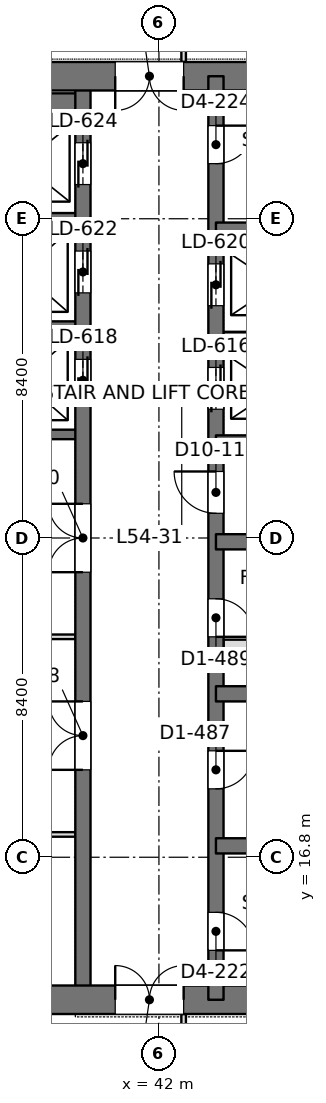
"""IFC4 building model, lengths in metres.
Left out: names, types, materials, properties, quantities, classifications, styles, units other than length and angle.
Written with IfcOpenShell. Run it as: python <this file> out.ifc"""

import sys

from ifc_helpers import new_model, si_unit, direction, frame, frame_2d, origin, place, context, subcontext, project, spatial, rectangle, extrude, element, fill, save


model = new_model("IFC4")
c1 = context("Model", 3, precision=1e-05, world=origin(), true_north=direction((0.0, 1.0)))
c2 = subcontext(c1, "Body", "Model", "MODEL_VIEW")
j1 = project(units=[si_unit("LENGTHUNIT", "METRE"), si_unit("PLANEANGLEUNIT", "RADIAN")], contexts=[c1])
p1 = place(None, origin())
s1 = spatial("IfcSite", under=j1, at=p1, CompositionType="ELEMENT")
p2 = place(p1, origin())
s2 = spatial("IfcBuilding", under=s1, at=p2, CompositionType="ELEMENT")
p3 = place(p2, frame((0.0, 0.0, 236.4)))
s3 = spatial("IfcBuildingStorey", under=s2, at=p3, CompositionType="ELEMENT", Elevation=236.4)
p4 = place(p3, frame((33.675, 13.05, 0.0), z_axis=(0.0, 0.0, 1.0), x_axis=(1.0, 0.0, 0.0)))
e1 = element("IfcWall", 1, at=p4, inside=s3, PredefinedType="SHEAR", context=c2, shape_type="SweptSolid", body=[
    extrude(rectangle(XDim=17.85, YDim=0.75, at=frame_2d((8.925, 0.0))), origin(), (0.0, 0.0, 1.0), 4.2),
])
p5 = place(p4, frame((7.175, 0.0, 0.0)))
e2 = element("IfcOpeningElement", 2, at=p5, cuts=e1, PredefinedType="OPENING", context=c2, shape_type="SweptSolid", body=[
    extrude(rectangle(XDim=1.8, YDim=2.4, at=frame_2d((0.9, 1.2))), frame((0.0, 0.385, 0.0), z_axis=(0.0, -1.0, 0.0), x_axis=(1.0, 0.0, 0.0)), (0.0, 0.0, 1.0), 0.77),
])
p6 = place(p3, frame((33.675, 37.35, 0.0), z_axis=(0.0, 0.0, 1.0), x_axis=(1.0, 0.0, 0.0)))
e3 = element("IfcWall", 3, at=p6, inside=s3, PredefinedType="SHEAR", context=c2, shape_type="SweptSolid", body=[
    extrude(rectangle(XDim=17.85, YDim=0.75, at=frame_2d((8.925, 0.0))), origin(), (0.0, 0.0, 1.0), 4.2),
])
p7 = place(p6, frame((7.175, 0.0, 0.0)))
e4 = element("IfcOpeningElement", 4, at=p7, cuts=e3, PredefinedType="OPENING", context=c2, shape_type="SweptSolid", body=[
    extrude(rectangle(XDim=1.8, YDim=2.4, at=frame_2d((0.9, 1.2))), frame((0.0, 0.385, 0.0), z_axis=(0.0, -1.0, 0.0), x_axis=(1.0, 0.0, 0.0)), (0.0, 0.0, 1.0), 0.77),
])
p8 = place(p3, frame((43.5, 13.05, 0.0), z_axis=(0.0, 0.0, 1.0), x_axis=(0.0, 1.0, 0.0)))
e5 = element("IfcWall", 5, at=p8, inside=s3, PredefinedType="SHEAR", context=c2, shape_type="SweptSolid", body=[
    extrude(rectangle(XDim=24.3, YDim=0.4, at=frame_2d((12.15, 0.0))), origin(), (0.0, 0.0, 1.0), 4.2),
])
p9 = place(p8, frame((1.3, 0.0, 0.0)))
e6 = element("IfcOpeningElement", 6, at=p9, cuts=e5, PredefinedType="OPENING", context=c2, shape_type="SweptSolid", body=[
    extrude(rectangle(XDim=1.0, YDim=2.2, at=frame_2d((0.5, 1.1))), frame((0.0, 0.21, 0.0), z_axis=(0.0, -1.0, 0.0), x_axis=(1.0, 0.0, 0.0)), (0.0, 0.0, 1.0), 0.42),
])
p10 = place(p8, frame((22.0, 0.0, 0.0)))
e7 = element("IfcOpeningElement", 7, at=p10, cuts=e5, PredefinedType="OPENING", context=c2, shape_type="SweptSolid", body=[
    extrude(rectangle(XDim=1.0, YDim=2.2, at=frame_2d((0.5, 1.1))), frame((0.0, 0.21, 0.0), z_axis=(0.0, -1.0, 0.0), x_axis=(1.0, 0.0, 0.0)), (0.0, 0.0, 1.0), 0.42),
])
p11 = place(p8, frame((5.55, 0.0, 0.0)))
e8 = element("IfcOpeningElement", 8, at=p11, cuts=e5, PredefinedType="OPENING", context=c2, shape_type="SweptSolid", body=[
    extrude(rectangle(XDim=1.0, YDim=2.2, at=frame_2d((0.5, 1.1))), frame((0.0, 0.21, 0.0), z_axis=(0.0, -1.0, 0.0), x_axis=(1.0, 0.0, 0.0)), (0.0, 0.0, 1.0), 0.42),
])
p12 = place(p8, frame((9.55, 0.0, 0.0)))
e9 = element("IfcOpeningElement", 9, at=p12, cuts=e5, PredefinedType="OPENING", context=c2, shape_type="SweptSolid", body=[
    extrude(rectangle(XDim=1.0, YDim=2.2, at=frame_2d((0.5, 1.1))), frame((0.0, 0.21, 0.0), z_axis=(0.0, -1.0, 0.0), x_axis=(1.0, 0.0, 0.0)), (0.0, 0.0, 1.0), 0.42),
])
p13 = place(p8, frame((12.8, 0.0, 0.0)))
e10 = element("IfcOpeningElement", 10, at=p13, cuts=e5, PredefinedType="OPENING", context=c2, shape_type="SweptSolid", body=[
    extrude(rectangle(XDim=1.1, YDim=2.2, at=frame_2d((0.55, 1.1))), frame((0.0, 0.21, 0.0), z_axis=(0.0, -1.0, 0.0), x_axis=(1.0, 0.0, 0.0)), (0.0, 0.0, 1.0), 0.42),
])
p14 = place(p8, frame((15.538, 0.0, 0.0)))
e11 = element("IfcOpeningElement", 11, at=p14, cuts=e5, PredefinedType="OPENING", context=c2, shape_type="SweptSolid", body=[
    extrude(rectangle(XDim=1.1, YDim=2.2, at=frame_2d((0.55, 1.1))), frame((0.0, 0.21, 0.0), z_axis=(0.0, -1.0, 0.0), x_axis=(1.0, 0.0, 0.0)), (0.0, 0.0, 1.0), 0.42),
])
p15 = place(p8, frame((18.262, 0.0, 0.0)))
e12 = element("IfcOpeningElement", 12, at=p15, cuts=e5, PredefinedType="OPENING", context=c2, shape_type="SweptSolid", body=[
    extrude(rectangle(XDim=1.1, YDim=2.2, at=frame_2d((0.55, 1.1))), frame((0.0, 0.21, 0.0), z_axis=(0.0, -1.0, 0.0), x_axis=(1.0, 0.0, 0.0)), (0.0, 0.0, 1.0), 0.42),
])
p16 = place(p3, frame((40.0, 13.05, 0.0), z_axis=(0.0, 0.0, 1.0), x_axis=(0.0, 1.0, 0.0)))
e13 = element("IfcWall", 13, at=p16, inside=s3, PredefinedType="SHEAR", context=c2, shape_type="SweptSolid", body=[
    extrude(rectangle(XDim=24.3, YDim=0.4, at=frame_2d((12.15, 0.0))), origin(), (0.0, 0.0, 1.0), 4.2),
])
p17 = place(p16, frame((15.75, 0.0, 0.0)))
e14 = element("IfcOpeningElement", 14, at=p17, cuts=e13, PredefinedType="OPENING", context=c2, shape_type="SweptSolid", body=[
    extrude(rectangle(XDim=1.1, YDim=2.2, at=frame_2d((0.55, 1.1))), frame((0.0, 0.21, 0.0), z_axis=(0.0, -1.0, 0.0), x_axis=(1.0, 0.0, 0.0)), (0.0, 0.0, 1.0), 0.42),
])
p18 = place(p16, frame((18.6, 0.0, 0.0)))
e15 = element("IfcOpeningElement", 15, at=p18, cuts=e13, PredefinedType="OPENING", context=c2, shape_type="SweptSolid", body=[
    extrude(rectangle(XDim=1.1, YDim=2.2, at=frame_2d((0.55, 1.1))), frame((0.0, 0.21, 0.0), z_axis=(0.0, -1.0, 0.0), x_axis=(1.0, 0.0, 0.0)), (0.0, 0.0, 1.0), 0.42),
])
p19 = place(p16, frame((21.45, 0.0, 0.0)))
e16 = element("IfcOpeningElement", 16, at=p19, cuts=e13, PredefinedType="OPENING", context=c2, shape_type="SweptSolid", body=[
    extrude(rectangle(XDim=1.1, YDim=2.2, at=frame_2d((0.55, 1.1))), frame((0.0, 0.21, 0.0), z_axis=(0.0, -1.0, 0.0), x_axis=(1.0, 0.0, 0.0)), (0.0, 0.0, 1.0), 0.42),
])
p20 = place(p16, frame((6.05, 0.0, 0.0)))
e17 = element("IfcOpeningElement", 17, at=p20, cuts=e13, PredefinedType="OPENING", context=c2, shape_type="SweptSolid", body=[
    extrude(rectangle(XDim=1.8, YDim=2.4, at=frame_2d((0.9, 1.2))), frame((0.0, 0.21, 0.0), z_axis=(0.0, -1.0, 0.0), x_axis=(1.0, 0.0, 0.0)), (0.0, 0.0, 1.0), 0.42),
])
p21 = place(p16, frame((11.25, 0.0, 0.0)))
e18 = element("IfcOpeningElement", 18, at=p21, cuts=e13, PredefinedType="OPENING", context=c2, shape_type="SweptSolid", body=[
    extrude(rectangle(XDim=1.8, YDim=2.4, at=frame_2d((0.9, 1.2))), frame((0.0, 0.21, 0.0), z_axis=(0.0, -1.0, 0.0), x_axis=(1.0, 0.0, 0.0)), (0.0, 0.0, 1.0), 0.42),
])
for number, where, z_axis, x_axis in (
    (19, (51.15, 17.1, 0.0), (0.0, 0.0, 1.0), (-1.0, 0.0, 0.0)),
    (20, (51.15, 21.1, 0.0), (0.0, 0.0, 1.0), (-1.0, 0.0, 0.0)),
    (21, (51.15, 25.1, 0.0), (0.0, 0.0, 1.0), (-1.0, 0.0, 0.0)),
    (22, (51.15, 27.7, 0.0), (0.0, 0.0, 1.0), (-1.0, 0.0, 0.0)),
    (23, (51.15, 33.3, 0.0), (0.0, 0.0, 1.0), (-1.0, 0.0, 0.0)),
):
    element("IfcWall", number, at=place(p3, frame(where, z_axis=z_axis, x_axis=x_axis)), inside=s3, PredefinedType="SHEAR", context=c2, shape_type="SweptSolid", body=[
        extrude(rectangle(XDim=7.65, YDim=0.4, at=frame_2d((3.825, 0.0))), origin(), (0.0, 0.0, 1.0), 4.2),
    ])
p22 = place(p3, frame((46.7, 30.5, 0.0), z_axis=(0.0, 0.0, 1.0), x_axis=(-1.0, 0.0, 0.0)))
e24 = element("IfcWall", 24, at=p22, inside=s3, PredefinedType="SHEAR", context=c2, shape_type="SweptSolid", body=[
    extrude(rectangle(XDim=3.2, YDim=0.25, at=frame_2d((1.6, 0.0))), origin(), (0.0, 0.0, 1.0), 4.2),
])
p23 = place(p3, frame((40.0, 27.925, 0.0), z_axis=(0.0, 0.0, 1.0), x_axis=(-1.0, 0.0, 0.0)))
e25 = element("IfcWall", 25, at=p23, inside=s3, PredefinedType="SHEAR", context=c2, shape_type="SweptSolid", body=[
    extrude(rectangle(XDim=5.95, YDim=0.25, at=frame_2d((2.975, 0.0))), origin(), (0.0, 0.0, 1.0), 4.2),
])
for number, where, z_axis, x_axis in (
    (26, (40.0, 30.775, 0.0), (0.0, 0.0, 1.0), (-1.0, 0.0, 0.0)),
    (27, (40.0, 33.625, 0.0), (0.0, 0.0, 1.0), (-1.0, 0.0, 0.0)),
):
    element("IfcWall", number, at=place(p3, frame(where, z_axis=z_axis, x_axis=x_axis)), inside=s3, PredefinedType="SHEAR", context=c2, shape_type="SweptSolid", body=[
        extrude(rectangle(XDim=3.2, YDim=0.25, at=frame_2d((1.6, 0.0))), origin(), (0.0, 0.0, 1.0), 4.2),
    ])
p24 = place(p3, frame((40.0, 36.625, 0.0), z_axis=(0.0, 0.0, 1.0), x_axis=(-1.0, 0.0, 0.0)))
e28 = element("IfcWall", 28, at=p24, inside=s3, PredefinedType="SHEAR", context=c2, shape_type="SweptSolid", body=[
    extrude(rectangle(XDim=3.2, YDim=0.55, at=frame_2d((1.6, 0.0))), origin(), (0.0, 0.0, 1.0), 4.2),
])
p25 = place(p3, frame((33.898, 17.4, 0.0), z_axis=(0.0, 0.0, 1.0), x_axis=(1.0, 0.0, 0.0)))
e29 = element("IfcWall", 29, at=p25, inside=s3, PredefinedType="PARTITIONING", context=c2, shape_type="SweptSolid", body=[
    extrude(rectangle(XDim=5.904, YDim=0.12, at=frame_2d((2.952, 0.0))), origin(), (0.0, 0.0, 1.0), 3.55),
])
p26 = place(p3, frame((34.749, 22.6, 0.0), z_axis=(0.0, 0.0, 1.0), x_axis=(1.0, 0.0, 0.0)))
e30 = element("IfcWall", 30, at=p26, inside=s3, PredefinedType="PARTITIONING", context=c2, shape_type="SweptSolid", body=[
    extrude(rectangle(XDim=5.053, YDim=0.12, at=frame_2d((2.526, 0.0))), origin(), (0.0, 0.0, 1.0), 4.05),
])
p27 = place(p3, frame((42.65, 11.158, 0.0), z_axis=(0.0, 0.0, 1.0), x_axis=(0.0, 1.0, 0.0)))
e31 = element("IfcWall", 31, at=p27, inside=s3, PredefinedType="PARTITIONING", context=c2, shape_type="SweptSolid", body=[
    extrude(rectangle(XDim=1.518, YDim=0.12, at=frame_2d((0.759, 0.0))), origin(), (0.0, 0.0, 1.0), 4.05),
])
p28 = place(p27, frame((0.192, 0.0, 0.0)))
e32 = element("IfcOpeningElement", 32, at=p28, cuts=e31, PredefinedType="OPENING", context=c2, shape_type="SweptSolid", body=[
    extrude(rectangle(XDim=1.0, YDim=2.4, at=frame_2d((0.5, 1.2))), frame((0.0, 0.07, 0.0), z_axis=(0.0, -1.0, 0.0), x_axis=(1.0, 0.0, 0.0)), (0.0, 0.0, 1.0), 0.14),
])
p29 = place(p3, frame((42.65, 37.724, 0.0), z_axis=(0.0, 0.0, 1.0), x_axis=(0.0, 1.0, 0.0)))
e33 = element("IfcWall", 33, at=p29, inside=s3, PredefinedType="PARTITIONING", context=c2, shape_type="SweptSolid", body=[
    extrude(rectangle(XDim=1.518, YDim=0.12, at=frame_2d((0.759, 0.0))), origin(), (0.0, 0.0, 1.0), 4.05),
])
p30 = place(p29, frame((0.326, 0.0, 0.0)))
e34 = element("IfcOpeningElement", 34, at=p30, cuts=e33, PredefinedType="OPENING", context=c2, shape_type="SweptSolid", body=[
    extrude(rectangle(XDim=1.0, YDim=2.4, at=frame_2d((0.5, 1.2))), frame((0.0, 0.07, 0.0), z_axis=(0.0, -1.0, 0.0), x_axis=(1.0, 0.0, 0.0)), (0.0, 0.0, 1.0), 0.14),
])
p31 = place(p3, frame((43.7, 22.4, 0.0), z_axis=(0.0, 0.0, 1.0), x_axis=(1.0, 0.0, 0.0)))
e35 = element("IfcWall", 35, at=p31, inside=s3, PredefinedType="PARTITIONING", context=c2, shape_type="SweptSolid", body=[
    extrude(rectangle(XDim=6.675, YDim=0.25, at=frame_2d((3.337, 0.0))), origin(), (0.0, 0.0, 1.0), 4.0),
])
p32 = place(p31, frame((2.863, 0.0, 0.0)))
e36 = element("IfcOpeningElement", 36, at=p32, cuts=e35, PredefinedType="OPENING", context=c2, shape_type="SweptSolid", body=[
    extrude(rectangle(XDim=0.9, YDim=2.2, at=frame_2d((0.45, 1.1))), frame((0.0, 0.135, 0.0), z_axis=(0.0, -1.0, 0.0), x_axis=(1.0, 0.0, 0.0)), (0.0, 0.0, 1.0), 0.27),
])
p33 = place(p5, origin())
e37 = element("IfcDoor", 37, at=p33, inside=s3, OperationType="DOUBLE_DOOR_SINGLE_SWING", PredefinedType="DOOR", context=c2, shape_type="SweptSolid", body=[
    extrude(rectangle(XDim=1.8, YDim=2.4, at=frame_2d((0.9, 1.2))), frame((0.0, 0.025, 0.0), z_axis=(0.0, -1.0, 0.0), x_axis=(1.0, 0.0, 0.0)), (0.0, 0.0, 1.0), 0.05),
])
fill(e2, e37)
p34 = place(p7, frame((1.8, 0.0, 0.0), z_axis=(0.0, 0.0, 1.0), x_axis=(-1.0, 0.0, 0.0)))
e38 = element("IfcDoor", 38, at=p34, inside=s3, OperationType="DOUBLE_DOOR_SINGLE_SWING", PredefinedType="DOOR", context=c2, shape_type="SweptSolid", body=[
    extrude(rectangle(XDim=1.8, YDim=2.4, at=frame_2d((0.9, 1.2))), frame((0.0, 0.025, 0.0), z_axis=(0.0, -1.0, 0.0), x_axis=(1.0, 0.0, 0.0)), (0.0, 0.0, 1.0), 0.05),
])
fill(e4, e38)
p35 = place(p9, frame((1.0, 0.0, 0.0), z_axis=(0.0, 0.0, 1.0), x_axis=(-1.0, 0.0, 0.0)))
e39 = element("IfcDoor", 39, at=p35, inside=s3, OperationType="SINGLE_SWING_RIGHT", PredefinedType="DOOR", context=c2, shape_type="SweptSolid", body=[
    extrude(rectangle(XDim=1.0, YDim=2.2, at=frame_2d((0.5, 1.1))), frame((0.0, 0.025, 0.0), z_axis=(0.0, -1.0, 0.0), x_axis=(1.0, 0.0, 0.0)), (0.0, 0.0, 1.0), 0.05),
])
fill(e6, e39)
p36 = place(p10, frame((1.0, 0.0, 0.0), z_axis=(0.0, 0.0, 1.0), x_axis=(-1.0, 0.0, 0.0)))
e40 = element("IfcDoor", 40, at=p36, inside=s3, OperationType="SINGLE_SWING_LEFT", PredefinedType="DOOR", context=c2, shape_type="SweptSolid", body=[
    extrude(rectangle(XDim=1.0, YDim=2.2, at=frame_2d((0.5, 1.1))), frame((0.0, 0.025, 0.0), z_axis=(0.0, -1.0, 0.0), x_axis=(1.0, 0.0, 0.0)), (0.0, 0.0, 1.0), 0.05),
])
fill(e7, e40)
p37 = place(p11, frame((1.0, 0.0, 0.0), z_axis=(0.0, 0.0, 1.0), x_axis=(-1.0, 0.0, 0.0)))
e41 = element("IfcDoor", 41, at=p37, inside=s3, OperationType="SINGLE_SWING_LEFT", PredefinedType="DOOR", context=c2, shape_type="SweptSolid", body=[
    extrude(rectangle(XDim=1.0, YDim=2.2, at=frame_2d((0.5, 1.1))), frame((0.0, 0.025, 0.0), z_axis=(0.0, -1.0, 0.0), x_axis=(1.0, 0.0, 0.0)), (0.0, 0.0, 1.0), 0.05),
])
fill(e8, e41)
p38 = place(p12, frame((1.0, 0.0, 0.0), z_axis=(0.0, 0.0, 1.0), x_axis=(-1.0, 0.0, 0.0)))
e42 = element("IfcDoor", 42, at=p38, inside=s3, OperationType="SINGLE_SWING_RIGHT", PredefinedType="DOOR", context=c2, shape_type="SweptSolid", body=[
    extrude(rectangle(XDim=1.0, YDim=2.2, at=frame_2d((0.5, 1.1))), frame((0.0, 0.025, 0.0), z_axis=(0.0, -1.0, 0.0), x_axis=(1.0, 0.0, 0.0)), (0.0, 0.0, 1.0), 0.05),
])
fill(e9, e42)
p39 = place(p13, origin())
e43 = element("IfcDoor", 43, at=p39, inside=s3, OperationType="SINGLE_SWING_RIGHT", PredefinedType="DOOR", context=c2, shape_type="SweptSolid", body=[
    extrude(rectangle(XDim=1.1, YDim=2.2, at=frame_2d((0.55, 1.1))), frame((0.0, 0.025, 0.0), z_axis=(0.0, -1.0, 0.0), x_axis=(1.0, 0.0, 0.0)), (0.0, 0.0, 1.0), 0.05),
])
fill(e10, e43)
p40 = place(p17, origin())
e44 = element("IfcDoor", 44, at=p40, inside=s3, OperationType="DOUBLE_DOOR_SLIDING", PredefinedType="DOOR", context=c2, shape_type="SweptSolid", body=[
    extrude(rectangle(XDim=1.1, YDim=2.2, at=frame_2d((0.55, 1.1))), frame((0.0, 0.025, 0.0), z_axis=(0.0, -1.0, 0.0), x_axis=(1.0, 0.0, 0.0)), (0.0, 0.0, 1.0), 0.05),
])
fill(e14, e44)
p41 = place(p18, origin())
e45 = element("IfcDoor", 45, at=p41, inside=s3, OperationType="DOUBLE_DOOR_SLIDING", PredefinedType="DOOR", context=c2, shape_type="SweptSolid", body=[
    extrude(rectangle(XDim=1.1, YDim=2.2, at=frame_2d((0.55, 1.1))), frame((0.0, 0.025, 0.0), z_axis=(0.0, -1.0, 0.0), x_axis=(1.0, 0.0, 0.0)), (0.0, 0.0, 1.0), 0.05),
])
fill(e15, e45)
p42 = place(p19, origin())
e46 = element("IfcDoor", 46, at=p42, inside=s3, OperationType="DOUBLE_DOOR_SLIDING", PredefinedType="DOOR", context=c2, shape_type="SweptSolid", body=[
    extrude(rectangle(XDim=1.1, YDim=2.2, at=frame_2d((0.55, 1.1))), frame((0.0, 0.025, 0.0), z_axis=(0.0, -1.0, 0.0), x_axis=(1.0, 0.0, 0.0)), (0.0, 0.0, 1.0), 0.05),
])
fill(e16, e46)
p43 = place(p14, origin())
e47 = element("IfcDoor", 47, at=p43, inside=s3, OperationType="DOUBLE_DOOR_SLIDING", PredefinedType="DOOR", context=c2, shape_type="SweptSolid", body=[
    extrude(rectangle(XDim=1.1, YDim=2.2, at=frame_2d((0.55, 1.1))), frame((0.0, 0.025, 0.0), z_axis=(0.0, -1.0, 0.0), x_axis=(1.0, 0.0, 0.0)), (0.0, 0.0, 1.0), 0.05),
])
fill(e11, e47)
p44 = place(p15, origin())
e48 = element("IfcDoor", 48, at=p44, inside=s3, OperationType="DOUBLE_DOOR_SLIDING", PredefinedType="DOOR", context=c2, shape_type="SweptSolid", body=[
    extrude(rectangle(XDim=1.1, YDim=2.2, at=frame_2d((0.55, 1.1))), frame((0.0, 0.025, 0.0), z_axis=(0.0, -1.0, 0.0), x_axis=(1.0, 0.0, 0.0)), (0.0, 0.0, 1.0), 0.05),
])
fill(e12, e48)
p45 = place(p20, origin())
e49 = element("IfcDoor", 49, at=p45, inside=s3, OperationType="DOUBLE_DOOR_SINGLE_SWING", PredefinedType="DOOR", context=c2, shape_type="SweptSolid", body=[
    extrude(rectangle(XDim=1.8, YDim=2.4, at=frame_2d((0.9, 1.2))), frame((0.0, 0.025, 0.0), z_axis=(0.0, -1.0, 0.0), x_axis=(1.0, 0.0, 0.0)), (0.0, 0.0, 1.0), 0.05),
])
fill(e17, e49)
p46 = place(p21, origin())
e50 = element("IfcDoor", 50, at=p46, inside=s3, OperationType="DOUBLE_DOOR_SINGLE_SWING", PredefinedType="DOOR", context=c2, shape_type="SweptSolid", body=[
    extrude(rectangle(XDim=1.8, YDim=2.4, at=frame_2d((0.9, 1.2))), frame((0.0, 0.025, 0.0), z_axis=(0.0, -1.0, 0.0), x_axis=(1.0, 0.0, 0.0)), (0.0, 0.0, 1.0), 0.05),
])
fill(e18, e50)
save(model, sys.argv[1])
